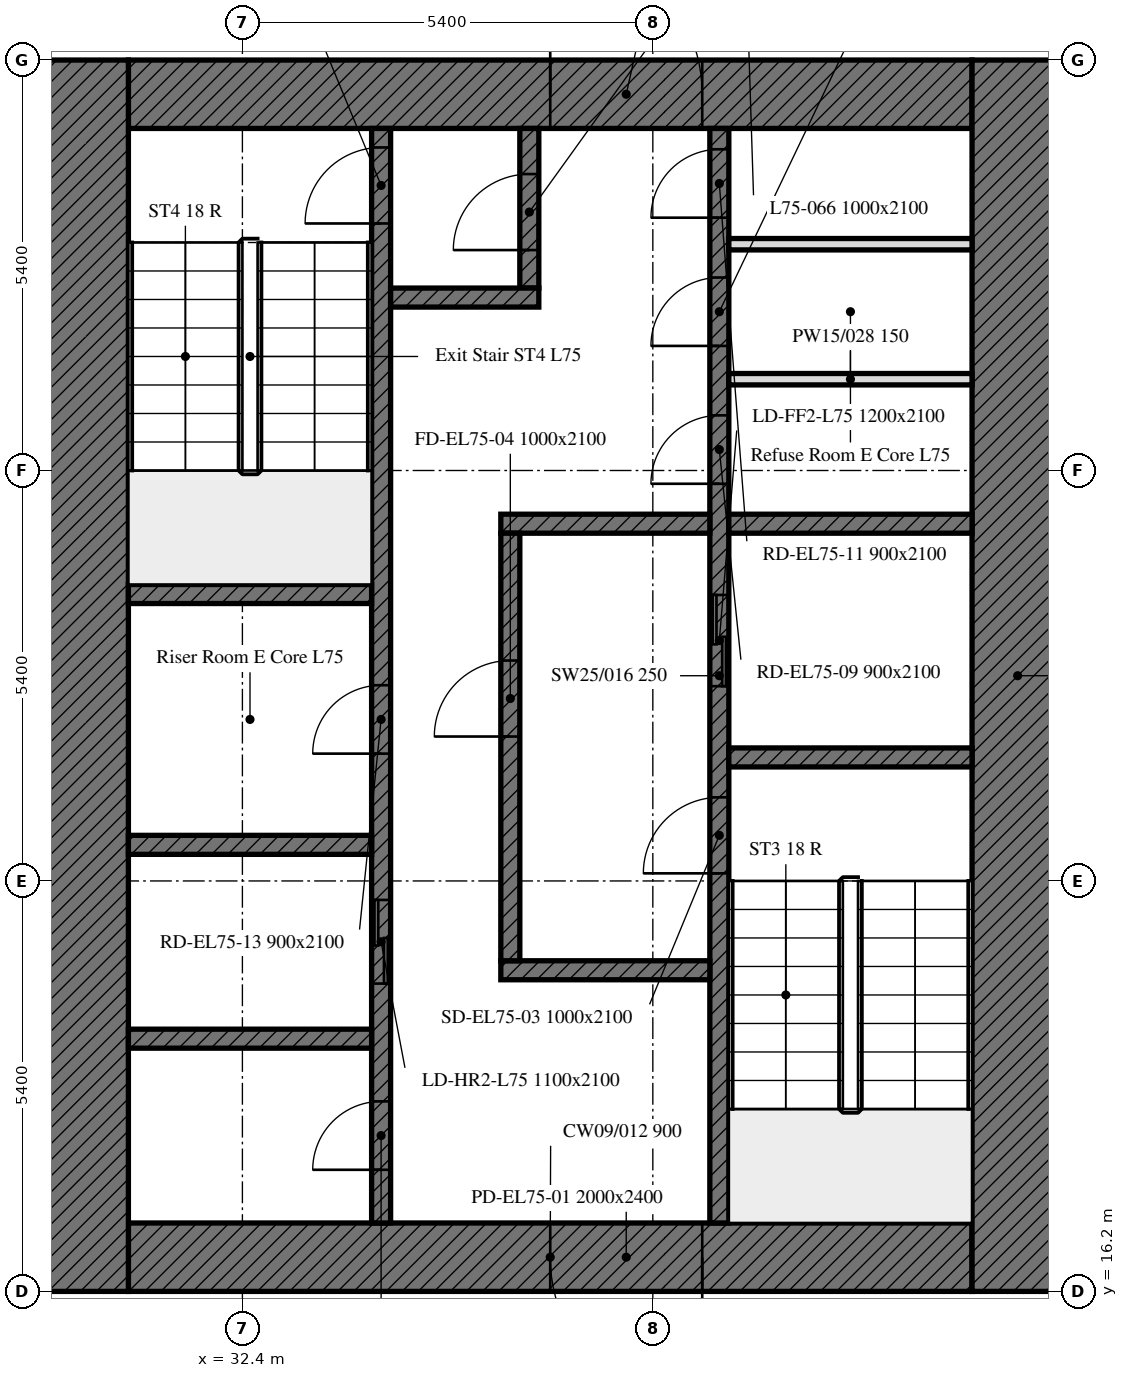
"""IFC4 building model, lengths in metres.
Left out: names, types, materials, properties, quantities, classifications, styles, units other than length and angle.
Written with IfcOpenShell. Run it as: python <this file> out.ifc"""

import sys

from ifc_helpers import new_model, si_unit, direction, frame, frame_2d, origin, place, context, subcontext, project, spatial, rectangle, extrude, element, fill, save


model = new_model("IFC4")
c1 = context("Model", 3, precision=1e-05, world=origin(), true_north=direction((0.0, 1.0)))
c2 = subcontext(c1, "Body", "Model", "MODEL_VIEW")
j1 = project(units=[si_unit("LENGTHUNIT", "METRE"), si_unit("PLANEANGLEUNIT", "RADIAN")], contexts=[c1])
p1 = place(None, origin())
s1 = spatial("IfcSite", under=j1, at=p1, CompositionType="ELEMENT")
p2 = place(p1, origin())
s2 = spatial("IfcBuilding", under=s1, at=p2, CompositionType="ELEMENT")
p3 = place(p2, frame((0.0, 0.0, 301.6)))
s3 = spatial("IfcBuildingStorey", under=s2, at=p3, CompositionType="ELEMENT", Elevation=301.6)
p4 = place(p3, frame((42.0, 16.65, 0.0), z_axis=(0.0, 0.0, 1.0), x_axis=(-1.0, 0.0, 0.0)))
e1 = element("IfcWall", 1, at=p4, inside=s3, PredefinedType="SOLIDWALL", context=c2, shape_type="SweptSolid", body=[
    extrude(rectangle(XDim=11.1, YDim=0.9, at=frame_2d((5.55, 0.0))), origin(), (0.0, 0.0, 1.0), 3.0),
])
p5 = place(p4, frame((3.55, 0.0, 0.0)))
e2 = element("IfcOpeningElement", 2, at=p5, cuts=e1, PredefinedType="OPENING", context=c2, shape_type="SweptSolid", body=[
    extrude(rectangle(XDim=2.0, YDim=2.4, at=frame_2d((1.0, 1.2))), frame((0.0, 0.45, 0.0), z_axis=(0.0, -1.0, 0.0), x_axis=(1.0, 0.0, 0.0)), (0.0, 0.0, 1.0), 0.9),
])
p6 = place(p3, frame((30.9, 31.95, 0.0), z_axis=(0.0, 0.0, 1.0), x_axis=(1.0, 0.0, 0.0)))
e3 = element("IfcWall", 3, at=p6, inside=s3, PredefinedType="SOLIDWALL", context=c2, shape_type="SweptSolid", body=[
    extrude(rectangle(XDim=11.1, YDim=0.9, at=frame_2d((5.55, 0.0))), origin(), (0.0, 0.0, 1.0), 3.0),
])
p7 = place(p6, frame((5.55, 0.0, 0.0)))
e4 = element("IfcOpeningElement", 4, at=p7, cuts=e3, PredefinedType="OPENING", context=c2, shape_type="SweptSolid", body=[
    extrude(rectangle(XDim=2.0, YDim=2.4, at=frame_2d((1.0, 1.2))), frame((0.0, 0.45, 0.0), z_axis=(0.0, -1.0, 0.0), x_axis=(1.0, 0.0, 0.0)), (0.0, 0.0, 1.0), 0.9),
])
for number, where, z_axis, x_axis in (
    (5, (42.6, 32.4, 0.0), (0.0, 0.0, 1.0), (0.0, -1.0, 0.0)),
    (6, (30.3, 16.2, 0.0), (0.0, 0.0, 1.0), (0.0, 1.0, 0.0)),
):
    element("IfcWall", number, at=place(p3, frame(where, z_axis=z_axis, x_axis=x_axis)), inside=s3, PredefinedType="SOLIDWALL", context=c2, shape_type="SweptSolid", body=[
        extrude(rectangle(XDim=16.2, YDim=1.2, at=frame_2d((8.1, 0.0))), origin(), (0.0, 0.0, 1.0), 3.0),
    ])
p8 = place(p3, frame((38.675, 17.1, 0.0), z_axis=(0.0, 0.0, 1.0), x_axis=(0.0, 1.0, 0.0)))
e7 = element("IfcWall", 7, at=p8, inside=s3, PredefinedType="SOLIDWALL", context=c2, shape_type="SweptSolid", body=[
    extrude(rectangle(XDim=14.4, YDim=0.25, at=frame_2d((7.2, 0.0))), origin(), (0.0, 0.0, 1.0), 3.0),
])
p9 = place(p8, frame((4.6, 0.0, 0.0)))
e8 = element("IfcOpeningElement", 8, at=p9, cuts=e7, PredefinedType="OPENING", context=c2, shape_type="SweptSolid", body=[
    extrude(rectangle(XDim=1.0, YDim=2.1, at=frame_2d((0.5, 1.05))), frame((0.0, 0.125, 0.0), z_axis=(0.0, -1.0, 0.0), x_axis=(1.0, 0.0, 0.0)), (0.0, 0.0, 1.0), 0.25),
])
p10 = place(p8, frame((7.062, 0.0, 0.0)))
e9 = element("IfcOpeningElement", 9, at=p10, cuts=e7, PredefinedType="OPENING", context=c2, shape_type="SweptSolid", body=[
    extrude(rectangle(XDim=1.2, YDim=2.1, at=frame_2d((0.6, 1.05))), frame((0.0, 0.125, 0.0), z_axis=(0.0, -1.0, 0.0), x_axis=(1.0, 0.0, 0.0)), (0.0, 0.0, 1.0), 0.25),
])
p11 = place(p8, frame((9.726, 0.0, 0.0)))
e10 = element("IfcOpeningElement", 10, at=p11, cuts=e7, PredefinedType="OPENING", context=c2, shape_type="SweptSolid", body=[
    extrude(rectangle(XDim=0.9, YDim=2.1, at=frame_2d((0.45, 1.05))), frame((0.0, 0.125, 0.0), z_axis=(0.0, -1.0, 0.0), x_axis=(1.0, 0.0, 0.0)), (0.0, 0.0, 1.0), 0.25),
])
p12 = place(p8, frame((11.539, 0.0, 0.0)))
e11 = element("IfcOpeningElement", 11, at=p12, cuts=e7, PredefinedType="OPENING", context=c2, shape_type="SweptSolid", body=[
    extrude(rectangle(XDim=0.9, YDim=2.1, at=frame_2d((0.45, 1.05))), frame((0.0, 0.125, 0.0), z_axis=(0.0, -1.0, 0.0), x_axis=(1.0, 0.0, 0.0)), (0.0, 0.0, 1.0), 0.25),
])
p13 = place(p8, frame((13.226, 0.0, 0.0)))
e12 = element("IfcOpeningElement", 12, at=p13, cuts=e7, PredefinedType="OPENING", context=c2, shape_type="SweptSolid", body=[
    extrude(rectangle(XDim=0.9, YDim=2.1, at=frame_2d((0.45, 1.05))), frame((0.0, 0.125, 0.0), z_axis=(0.0, -1.0, 0.0), x_axis=(1.0, 0.0, 0.0)), (0.0, 0.0, 1.0), 0.25),
])
p14 = place(p3, frame((34.225, 17.1, 0.0), z_axis=(0.0, 0.0, 1.0), x_axis=(0.0, 1.0, 0.0)))
e13 = element("IfcWall", 13, at=p14, inside=s3, PredefinedType="SOLIDWALL", context=c2, shape_type="SweptSolid", body=[
    extrude(rectangle(XDim=14.4, YDim=0.25, at=frame_2d((7.2, 0.0))), origin(), (0.0, 0.0, 1.0), 3.0),
])
p15 = place(p14, frame((13.15, 0.0, 0.0)))
e14 = element("IfcOpeningElement", 14, at=p15, cuts=e13, PredefinedType="OPENING", context=c2, shape_type="SweptSolid", body=[
    extrude(rectangle(XDim=1.0, YDim=2.1, at=frame_2d((0.5, 1.05))), frame((0.0, 0.125, 0.0), z_axis=(0.0, -1.0, 0.0), x_axis=(1.0, 0.0, 0.0)), (0.0, 0.0, 1.0), 0.25),
])
p16 = place(p14, frame((3.15, 0.0, 0.0)))
e15 = element("IfcOpeningElement", 15, at=p16, cuts=e13, PredefinedType="OPENING", context=c2, shape_type="SweptSolid", body=[
    extrude(rectangle(XDim=1.1, YDim=2.1, at=frame_2d((0.55, 1.05))), frame((0.0, 0.125, 0.0), z_axis=(0.0, -1.0, 0.0), x_axis=(1.0, 0.0, 0.0)), (0.0, 0.0, 1.0), 0.25),
])
p17 = place(p14, frame((0.7, 0.0, 0.0)))
e16 = element("IfcOpeningElement", 16, at=p17, cuts=e13, PredefinedType="OPENING", context=c2, shape_type="SweptSolid", body=[
    extrude(rectangle(XDim=0.9, YDim=2.1, at=frame_2d((0.45, 1.05))), frame((0.0, 0.125, 0.0), z_axis=(0.0, -1.0, 0.0), x_axis=(1.0, 0.0, 0.0)), (0.0, 0.0, 1.0), 0.25),
])
p18 = place(p14, frame((6.175, 0.0, 0.0)))
e17 = element("IfcOpeningElement", 17, at=p18, cuts=e13, PredefinedType="OPENING", context=c2, shape_type="SweptSolid", body=[
    extrude(rectangle(XDim=0.9, YDim=2.1, at=frame_2d((0.45, 1.05))), frame((0.0, 0.125, 0.0), z_axis=(0.0, -1.0, 0.0), x_axis=(1.0, 0.0, 0.0)), (0.0, 0.0, 1.0), 0.25),
])
p19 = place(p3, frame((38.8, 23.225, 0.0), z_axis=(0.0, 0.0, 1.0), x_axis=(1.0, 0.0, 0.0)))
e18 = element("IfcWall", 18, at=p19, inside=s3, PredefinedType="SOLIDWALL", context=c2, shape_type="SweptSolid", body=[
    extrude(rectangle(XDim=3.2, YDim=0.25, at=frame_2d((1.6, 0.0))), origin(), (0.0, 0.0, 1.0), 3.0),
])
for number, where, z_axis, x_axis in (
    (19, (30.9, 25.375, 0.0), (0.0, 0.0, 1.0), (1.0, 0.0, 0.0)),
    (20, (30.9, 22.075, 0.0), (0.0, 0.0, 1.0), (1.0, 0.0, 0.0)),
):
    element("IfcWall", number, at=place(p3, frame(where, z_axis=z_axis, x_axis=x_axis)), inside=s3, PredefinedType="SOLIDWALL", context=c2, shape_type="SweptSolid", body=[
        extrude(rectangle(XDim=3.2, YDim=0.25, at=frame_2d((1.6, 0.0))), origin(), (0.0, 0.0, 1.0), 3.0),
    ])
p20 = place(p3, frame((38.8, 26.3, 0.0), z_axis=(0.0, 0.0, 1.0), x_axis=(1.0, 0.0, 0.0)))
e21 = element("IfcWall", 21, at=p20, inside=s3, PredefinedType="SOLIDWALL", context=c2, shape_type="SweptSolid", body=[
    extrude(rectangle(XDim=3.2, YDim=0.25, at=frame_2d((1.6, 0.0))), origin(), (0.0, 0.0, 1.0), 3.0),
])
for number, where, z_axis, x_axis in (
    (22, (35.8, 26.3, 0.0), (0.0, 0.0, 1.0), (1.0, 0.0, 0.0)),
    (23, (35.8, 20.425, 0.0), (0.0, 0.0, 1.0), (1.0, 0.0, 0.0)),
):
    element("IfcWall", number, at=place(p3, frame(where, z_axis=z_axis, x_axis=x_axis)), inside=s3, PredefinedType="SOLIDWALL", context=c2, shape_type="SweptSolid", body=[
        extrude(rectangle(XDim=2.75, YDim=0.25, at=frame_2d((1.375, 0.0))), origin(), (0.0, 0.0, 1.0), 3.0),
    ])
p21 = place(p3, frame((36.175, 29.4, 0.0), z_axis=(0.0, 0.0, 1.0), x_axis=(0.0, 1.0, 0.0)))
e24 = element("IfcWall", 24, at=p21, inside=s3, PredefinedType="SOLIDWALL", context=c2, shape_type="SweptSolid", body=[
    extrude(rectangle(XDim=2.1, YDim=0.25, at=frame_2d((1.05, 0.0))), origin(), (0.0, 0.0, 1.0), 3.0),
])
p22 = place(p21, frame((0.5, 0.0, 0.0)))
e25 = element("IfcOpeningElement", 25, at=p22, cuts=e24, PredefinedType="OPENING", context=c2, shape_type="SweptSolid", body=[
    extrude(rectangle(XDim=1.0, YDim=2.1, at=frame_2d((0.5, 1.05))), frame((0.0, 0.125, 0.0), z_axis=(0.0, -1.0, 0.0), x_axis=(1.0, 0.0, 0.0)), (0.0, 0.0, 1.0), 0.25),
])
p23 = place(p3, frame((34.35, 29.275, 0.0), z_axis=(0.0, 0.0, 1.0), x_axis=(1.0, 0.0, 0.0)))
e26 = element("IfcWall", 26, at=p23, inside=s3, PredefinedType="SOLIDWALL", context=c2, shape_type="SweptSolid", body=[
    extrude(rectangle(XDim=1.95, YDim=0.25, at=frame_2d((0.975, 0.0))), origin(), (0.0, 0.0, 1.0), 3.0),
])
p24 = place(p3, frame((35.925, 20.55, 0.0), z_axis=(0.0, 0.0, 1.0), x_axis=(0.0, 1.0, 0.0)))
e27 = element("IfcWall", 27, at=p24, inside=s3, PredefinedType="SOLIDWALL", context=c2, shape_type="SweptSolid", body=[
    extrude(rectangle(XDim=5.625, YDim=0.25, at=frame_2d((2.812, 0.0))), origin(), (0.0, 0.0, 1.0), 3.0),
])
p25 = place(p24, frame((2.95, 0.0, 0.0)))
e28 = element("IfcOpeningElement", 28, at=p25, cuts=e27, PredefinedType="OPENING", context=c2, shape_type="SweptSolid", body=[
    extrude(rectangle(XDim=1.0, YDim=2.1, at=frame_2d((0.5, 1.05))), frame((0.0, 0.125, 0.0), z_axis=(0.0, -1.0, 0.0), x_axis=(1.0, 0.0, 0.0)), (0.0, 0.0, 1.0), 0.25),
])
p26 = place(p3, frame((30.9, 19.525, 0.0), z_axis=(0.0, 0.0, 1.0), x_axis=(1.0, 0.0, 0.0)))
e29 = element("IfcWall", 29, at=p26, inside=s3, PredefinedType="SOLIDWALL", context=c2, shape_type="SweptSolid", body=[
    extrude(rectangle(XDim=3.2, YDim=0.25, at=frame_2d((1.6, 0.0))), origin(), (0.0, 0.0, 1.0), 3.0),
])
for number, where, z_axis, x_axis in (
    (30, (38.8, 28.201, 0.0), (0.0, 0.0, 1.0), (1.0, 0.0, 0.0)),
    (31, (38.8, 29.977, 0.0), (0.0, 0.0, 1.0), (1.0, 0.0, 0.0)),
):
    element("IfcWall", number, at=place(p3, frame(where, z_axis=z_axis, x_axis=x_axis)), inside=s3, PredefinedType="PARTITIONING", context=c2, shape_type="SweptSolid", body=[
        extrude(rectangle(XDim=3.2, YDim=0.15, at=frame_2d((1.6, 0.0))), origin(), (0.0, 0.0, 1.0), 3.0),
    ])
p27 = place(p5, origin())
e32 = element("IfcDoor", 32, at=p27, inside=s3, OperationType="DOUBLE_DOOR_SINGLE_SWING", PredefinedType="DOOR", context=c2, shape_type="SweptSolid", body=[
    extrude(rectangle(XDim=2.0, YDim=2.4, at=frame_2d((1.0, 1.2))), frame((0.0, 0.025, 0.0), z_axis=(0.0, -1.0, 0.0), x_axis=(1.0, 0.0, 0.0)), (0.0, 0.0, 1.0), 0.05),
])
fill(e2, e32)
p28 = place(p7, origin())
e33 = element("IfcDoor", 33, at=p28, inside=s3, OperationType="DOUBLE_DOOR_SINGLE_SWING", PredefinedType="DOOR", context=c2, shape_type="SweptSolid", body=[
    extrude(rectangle(XDim=2.0, YDim=2.4, at=frame_2d((1.0, 1.2))), frame((0.0, 0.025, 0.0), z_axis=(0.0, -1.0, 0.0), x_axis=(1.0, 0.0, 0.0)), (0.0, 0.0, 1.0), 0.05),
])
fill(e4, e33)
p29 = place(p9, origin())
e34 = element("IfcDoor", 34, at=p29, inside=s3, OperationType="SINGLE_SWING_LEFT", PredefinedType="DOOR", context=c2, shape_type="SweptSolid", body=[
    extrude(rectangle(XDim=1.0, YDim=2.1, at=frame_2d((0.5, 1.05))), frame((0.0, 0.025, 0.0), z_axis=(0.0, -1.0, 0.0), x_axis=(1.0, 0.0, 0.0)), (0.0, 0.0, 1.0), 0.05),
])
fill(e8, e34)
p30 = place(p25, origin())
e35 = element("IfcDoor", 35, at=p30, inside=s3, OperationType="SINGLE_SWING_LEFT", PredefinedType="DOOR", context=c2, shape_type="SweptSolid", body=[
    extrude(rectangle(XDim=1.0, YDim=2.1, at=frame_2d((0.5, 1.05))), frame((0.0, 0.025, 0.0), z_axis=(0.0, -1.0, 0.0), x_axis=(1.0, 0.0, 0.0)), (0.0, 0.0, 1.0), 0.05),
])
fill(e28, e35)
p31 = place(p15, origin())
e36 = element("IfcDoor", 36, at=p31, inside=s3, OperationType="SINGLE_SWING_LEFT", PredefinedType="DOOR", context=c2, shape_type="SweptSolid", body=[
    extrude(rectangle(XDim=1.0, YDim=2.1, at=frame_2d((0.5, 1.05))), frame((0.0, 0.025, 0.0), z_axis=(0.0, -1.0, 0.0), x_axis=(1.0, 0.0, 0.0)), (0.0, 0.0, 1.0), 0.05),
])
fill(e14, e36)
p32 = place(p22, origin())
e37 = element("IfcDoor", 37, at=p32, inside=s3, OperationType="SINGLE_SWING_LEFT", PredefinedType="DOOR", context=c2, shape_type="SweptSolid", body=[
    extrude(rectangle(XDim=1.0, YDim=2.1, at=frame_2d((0.5, 1.05))), frame((0.0, 0.025, 0.0), z_axis=(0.0, -1.0, 0.0), x_axis=(1.0, 0.0, 0.0)), (0.0, 0.0, 1.0), 0.05),
])
fill(e25, e37)
p33 = place(p10, origin())
e38 = element("IfcDoor", 38, at=p33, inside=s3, OperationType="DOUBLE_DOOR_SLIDING", PredefinedType="DOOR", context=c2, shape_type="SweptSolid", body=[
    extrude(rectangle(XDim=1.2, YDim=2.1, at=frame_2d((0.6, 1.05))), frame((0.0, 0.025, 0.0), z_axis=(0.0, -1.0, 0.0), x_axis=(1.0, 0.0, 0.0)), (0.0, 0.0, 1.0), 0.05),
])
fill(e9, e38)
p34 = place(p16, origin())
e39 = element("IfcDoor", 39, at=p34, inside=s3, OperationType="DOUBLE_DOOR_SLIDING", PredefinedType="DOOR", context=c2, shape_type="SweptSolid", body=[
    extrude(rectangle(XDim=1.1, YDim=2.1, at=frame_2d((0.55, 1.05))), frame((0.0, 0.025, 0.0), z_axis=(0.0, -1.0, 0.0), x_axis=(1.0, 0.0, 0.0)), (0.0, 0.0, 1.0), 0.05),
])
fill(e15, e39)
p35 = place(p11, origin())
e40 = element("IfcDoor", 40, at=p35, inside=s3, OperationType="SINGLE_SWING_LEFT", PredefinedType="DOOR", context=c2, shape_type="SweptSolid", body=[
    extrude(rectangle(XDim=0.9, YDim=2.1, at=frame_2d((0.45, 1.05))), frame((0.0, 0.025, 0.0), z_axis=(0.0, -1.0, 0.0), x_axis=(1.0, 0.0, 0.0)), (0.0, 0.0, 1.0), 0.05),
])
fill(e10, e40)
p36 = place(p12, origin())
e41 = element("IfcDoor", 41, at=p36, inside=s3, OperationType="SINGLE_SWING_LEFT", PredefinedType="DOOR", context=c2, shape_type="SweptSolid", body=[
    extrude(rectangle(XDim=0.9, YDim=2.1, at=frame_2d((0.45, 1.05))), frame((0.0, 0.025, 0.0), z_axis=(0.0, -1.0, 0.0), x_axis=(1.0, 0.0, 0.0)), (0.0, 0.0, 1.0), 0.05),
])
fill(e11, e41)
p37 = place(p13, origin())
e42 = element("IfcDoor", 42, at=p37, inside=s3, OperationType="SINGLE_SWING_LEFT", PredefinedType="DOOR", context=c2, shape_type="SweptSolid", body=[
    extrude(rectangle(XDim=0.9, YDim=2.1, at=frame_2d((0.45, 1.05))), frame((0.0, 0.025, 0.0), z_axis=(0.0, -1.0, 0.0), x_axis=(1.0, 0.0, 0.0)), (0.0, 0.0, 1.0), 0.05),
])
fill(e12, e42)
p38 = place(p17, origin())
e43 = element("IfcDoor", 43, at=p38, inside=s3, OperationType="SINGLE_SWING_LEFT", PredefinedType="DOOR", context=c2, shape_type="SweptSolid", body=[
    extrude(rectangle(XDim=0.9, YDim=2.1, at=frame_2d((0.45, 1.05))), frame((0.0, 0.025, 0.0), z_axis=(0.0, -1.0, 0.0), x_axis=(1.0, 0.0, 0.0)), (0.0, 0.0, 1.0), 0.05),
])
fill(e16, e43)
p39 = place(p18, origin())
e44 = element("IfcDoor", 44, at=p39, inside=s3, OperationType="SINGLE_SWING_LEFT", PredefinedType="DOOR", context=c2, shape_type="SweptSolid", body=[
    extrude(rectangle(XDim=0.9, YDim=2.1, at=frame_2d((0.45, 1.05))), frame((0.0, 0.025, 0.0), z_axis=(0.0, -1.0, 0.0), x_axis=(1.0, 0.0, 0.0)), (0.0, 0.0, 1.0), 0.05),
])
fill(e17, e44)
save(model, sys.argv[1])
